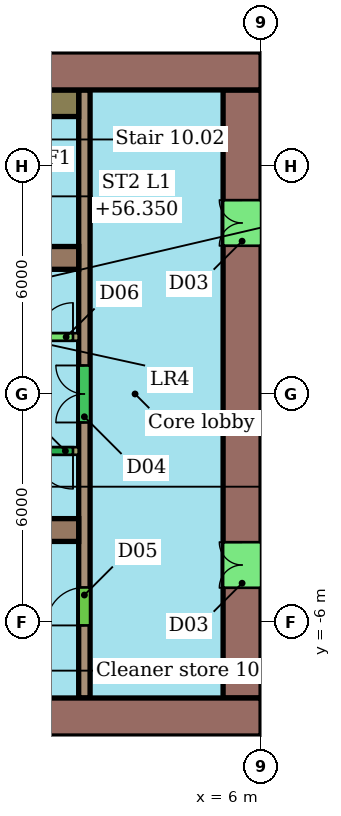
"""IFC4 building model, lengths in metres.
Left out: names, types, materials, properties, quantities, classifications, styles, units other than length and angle.
Written with IfcOpenShell. Run it as: python <this file> out.ifc"""

import sys

from ifc_helpers import new_model, si_unit, direction, frame, frame_2d, origin, place, context, subcontext, project, spatial, rectangle, extrude, element, fill, save


model = new_model("IFC4")
c1 = context("Model", 3, precision=1e-05, world=origin(), true_north=direction((0.0, 1.0)))
c2 = subcontext(c1, "Body", "Model", "MODEL_VIEW")
j1 = project(units=[si_unit("LENGTHUNIT", "METRE"), si_unit("PLANEANGLEUNIT", "RADIAN")], contexts=[c1])
p1 = place(None, origin())
s1 = spatial("IfcSite", under=j1, at=p1, CompositionType="ELEMENT")
p2 = place(p1, origin())
s2 = spatial("IfcBuilding", under=s1, at=p2, CompositionType="ELEMENT")
p3 = place(p2, frame((0.0, 0.0, 54.5)))
s3 = spatial("IfcBuildingStorey", under=s2, at=p3, CompositionType="ELEMENT", Elevation=54.5)
p4 = place(p3, frame((6.0, 8.5, 0.0), z_axis=(0.0, 0.0, 1.0), x_axis=(-1.0, 0.0, 0.0)))
e1 = element("IfcWall", 1, at=p4, inside=s3, PredefinedType="SHEAR", context=c2, shape_type="SweptSolid", body=[
    extrude(rectangle(XDim=12.0, YDim=1.0, at=frame_2d((6.0, 0.0))), origin(), (0.0, 0.0, 1.0), 3.4),
])
p5 = place(p4, frame((5.6, 0.0, 0.0)))
e2 = element("IfcOpeningElement", 2, at=p5, cuts=e1, PredefinedType="OPENING", context=c2, shape_type="SweptSolid", body=[
    extrude(rectangle(XDim=1.2, YDim=2.1, at=frame_2d((0.6, 1.05))), frame((0.0, 0.51, 0.0), z_axis=(0.0, -1.0, 0.0), x_axis=(1.0, 0.0, 0.0)), (0.0, 0.0, 1.0), 1.02),
])
p6 = place(p3, frame((-18.0, -8.5, 0.0), z_axis=(0.0, 0.0, 1.0), x_axis=(1.0, 0.0, 0.0)))
e3 = element("IfcWall", 3, at=p6, inside=s3, PredefinedType="SHEAR", context=c2, shape_type="SweptSolid", body=[
    extrude(rectangle(XDim=24.0, YDim=1.0, at=frame_2d((12.0, 0.0))), origin(), (0.0, 0.0, 1.0), 3.4),
])
p7 = place(p6, frame((6.0, 0.0, 0.0)))
e4 = element("IfcOpeningElement", 4, at=p7, cuts=e3, PredefinedType="OPENING", context=c2, shape_type="SweptSolid", body=[
    extrude(rectangle(XDim=1.2, YDim=2.1, at=frame_2d((0.6, 1.05))), frame((0.0, 0.51, 0.0), z_axis=(0.0, -1.0, 0.0), x_axis=(1.0, 0.0, 0.0)), (0.0, 0.0, 1.0), 1.02),
])
p8 = place(p3, frame((5.5, -8.0, 0.0), z_axis=(0.0, 0.0, 1.0), x_axis=(0.0, 1.0, 0.0)))
e5 = element("IfcWall", 5, at=p8, inside=s3, PredefinedType="SHEAR", context=c2, shape_type="SweptSolid", body=[
    extrude(rectangle(XDim=16.0, YDim=1.0, at=frame_2d((8.0, 0.0))), origin(), (0.0, 0.0, 1.0), 3.4),
])
p9 = place(p8, frame((2.9, 0.0, 0.0)))
e6 = element("IfcOpeningElement", 6, at=p9, cuts=e5, PredefinedType="OPENING", context=c2, shape_type="SweptSolid", body=[
    extrude(rectangle(XDim=1.2, YDim=2.1, at=frame_2d((0.6, 1.05))), frame((0.0, 0.51, 0.0), z_axis=(0.0, -1.0, 0.0), x_axis=(1.0, 0.0, 0.0)), (0.0, 0.0, 1.0), 1.02),
])
p10 = place(p8, frame((11.9, 0.0, 0.0)))
e7 = element("IfcOpeningElement", 7, at=p10, cuts=e5, PredefinedType="OPENING", context=c2, shape_type="SweptSolid", body=[
    extrude(rectangle(XDim=1.2, YDim=2.1, at=frame_2d((0.6, 1.05))), frame((0.0, 0.51, 0.0), z_axis=(0.0, -1.0, 0.0), x_axis=(1.0, 0.0, 0.0)), (0.0, 0.0, 1.0), 1.02),
])
for number, where, z_axis, x_axis in (
    (8, (-6.0, 3.58, 0.0), (0.0, 0.0, 1.0), (1.0, 0.0, 0.0)),
    (9, (-6.0, -3.58, 0.0), (0.0, 0.0, 1.0), (1.0, 0.0, 0.0)),
):
    element("IfcWall", number, at=place(p3, frame(where, z_axis=z_axis, x_axis=x_axis)), inside=s3, PredefinedType="SHEAR", context=c2, shape_type="SweptSolid", body=[
        extrude(rectangle(XDim=7.2, YDim=0.6, at=frame_2d((3.6, 0.0))), origin(), (0.0, 0.0, 1.0), 3.4),
    ])
p11 = place(p3, frame((1.35, -8.0, 0.0), z_axis=(0.0, 0.0, 1.0), x_axis=(0.0, 1.0, 0.0)))
e10 = element("IfcWall", 10, at=p11, inside=s3, PredefinedType="SHEAR", context=c2, shape_type="SweptSolid", body=[
    extrude(rectangle(XDim=16.0, YDim=0.3, at=frame_2d((8.0, 0.0))), origin(), (0.0, 0.0, 1.0), 3.4),
])
p12 = place(p11, frame((1.91, 0.0, 0.0)))
e11 = element("IfcOpeningElement", 11, at=p12, cuts=e10, PredefinedType="OPENING", context=c2, shape_type="SweptSolid", body=[
    extrude(rectangle(XDim=1.0, YDim=2.1, at=frame_2d((0.5, 1.05))), frame((0.0, 0.16, 0.0), z_axis=(0.0, -1.0, 0.0), x_axis=(1.0, 0.0, 0.0)), (0.0, 0.0, 1.0), 0.32),
])
p13 = place(p11, frame((7.25, 0.0, 0.0)))
e12 = element("IfcOpeningElement", 12, at=p13, cuts=e10, PredefinedType="OPENING", context=c2, shape_type="SweptSolid", body=[
    extrude(rectangle(XDim=1.5, YDim=2.1, at=frame_2d((0.75, 1.05))), frame((0.0, 0.16, 0.0), z_axis=(0.0, -1.0, 0.0), x_axis=(1.0, 0.0, 0.0)), (0.0, 0.0, 1.0), 0.32),
])
p14 = place(p3, frame((-13.2, 1.5, 0.0), z_axis=(0.0, 0.0, 1.0), x_axis=(1.0, 0.0, 0.0)))
e13 = element("IfcWall", 13, at=p14, inside=s3, PredefinedType="SHEAR", context=c2, shape_type="SweptSolid", body=[
    extrude(rectangle(XDim=14.4, YDim=0.2, at=frame_2d((7.2, 0.0))), origin(), (0.0, 0.0, 1.0), 3.4),
])
p15 = place(p14, frame((0.546, 0.0, 0.0)))
e14 = element("IfcOpeningElement", 14, at=p15, cuts=e13, PredefinedType="OPENING", context=c2, shape_type="SweptSolid", body=[
    extrude(rectangle(XDim=1.1, YDim=2.1, at=frame_2d((0.55, 1.05))), frame((0.0, 0.11, 0.0), z_axis=(0.0, -1.0, 0.0), x_axis=(1.0, 0.0, 0.0)), (0.0, 0.0, 1.0), 0.22),
])
p16 = place(p14, frame((2.988, 0.0, 0.0)))
e15 = element("IfcOpeningElement", 15, at=p16, cuts=e13, PredefinedType="OPENING", context=c2, shape_type="SweptSolid", body=[
    extrude(rectangle(XDim=1.1, YDim=2.1, at=frame_2d((0.55, 1.05))), frame((0.0, 0.11, 0.0), z_axis=(0.0, -1.0, 0.0), x_axis=(1.0, 0.0, 0.0)), (0.0, 0.0, 1.0), 0.22),
])
p17 = place(p14, frame((5.429, 0.0, 0.0)))
e16 = element("IfcOpeningElement", 16, at=p17, cuts=e13, PredefinedType="OPENING", context=c2, shape_type="SweptSolid", body=[
    extrude(rectangle(XDim=1.1, YDim=2.1, at=frame_2d((0.55, 1.05))), frame((0.0, 0.11, 0.0), z_axis=(0.0, -1.0, 0.0), x_axis=(1.0, 0.0, 0.0)), (0.0, 0.0, 1.0), 0.22),
])
p18 = place(p14, frame((7.871, 0.0, 0.0)))
e17 = element("IfcOpeningElement", 17, at=p18, cuts=e13, PredefinedType="OPENING", context=c2, shape_type="SweptSolid", body=[
    extrude(rectangle(XDim=1.1, YDim=2.1, at=frame_2d((0.55, 1.05))), frame((0.0, 0.11, 0.0), z_axis=(0.0, -1.0, 0.0), x_axis=(1.0, 0.0, 0.0)), (0.0, 0.0, 1.0), 0.22),
])
p19 = place(p14, frame((10.958, 0.0, 0.0)))
e18 = element("IfcOpeningElement", 18, at=p19, cuts=e13, PredefinedType="OPENING", context=c2, shape_type="SweptSolid", body=[
    extrude(rectangle(XDim=0.9, YDim=2.1, at=frame_2d((0.45, 1.05))), frame((0.0, 0.11, 0.0), z_axis=(0.0, -1.0, 0.0), x_axis=(1.0, 0.0, 0.0)), (0.0, 0.0, 1.0), 0.22),
])
p20 = place(p14, frame((13.35, 0.0, 0.0)))
e19 = element("IfcOpeningElement", 19, at=p20, cuts=e13, PredefinedType="OPENING", context=c2, shape_type="SweptSolid", body=[
    extrude(rectangle(XDim=0.9, YDim=2.1, at=frame_2d((0.45, 1.05))), frame((0.0, 0.11, 0.0), z_axis=(0.0, -1.0, 0.0), x_axis=(1.0, 0.0, 0.0)), (0.0, 0.0, 1.0), 0.22),
])
p21 = place(p3, frame((1.2, -1.5, 0.0), z_axis=(0.0, 0.0, 1.0), x_axis=(-1.0, 0.0, 0.0)))
e20 = element("IfcWall", 20, at=p21, inside=s3, PredefinedType="SHEAR", context=c2, shape_type="SweptSolid", body=[
    extrude(rectangle(XDim=14.4, YDim=0.2, at=frame_2d((7.2, 0.0))), origin(), (0.0, 0.0, 1.0), 3.4),
])
p22 = place(p21, frame((7.821, 0.0, 0.0)))
e21 = element("IfcOpeningElement", 21, at=p22, cuts=e20, PredefinedType="OPENING", context=c2, shape_type="SweptSolid", body=[
    extrude(rectangle(XDim=1.2, YDim=2.1, at=frame_2d((0.6, 1.05))), frame((0.0, 0.11, 0.0), z_axis=(0.0, -1.0, 0.0), x_axis=(1.0, 0.0, 0.0)), (0.0, 0.0, 1.0), 0.22),
])
p23 = place(p21, frame((0.15, 0.0, 0.0)))
e22 = element("IfcOpeningElement", 22, at=p23, cuts=e20, PredefinedType="OPENING", context=c2, shape_type="SweptSolid", body=[
    extrude(rectangle(XDim=1.0, YDim=2.1, at=frame_2d((0.5, 1.05))), frame((0.0, 0.11, 0.0), z_axis=(0.0, -1.0, 0.0), x_axis=(1.0, 0.0, 0.0)), (0.0, 0.0, 1.0), 0.22),
])
p24 = place(p3, frame((0.4, 7.65, 0.0), z_axis=(0.0, 0.0, 1.0), x_axis=(1.0, 0.0, 0.0)))
e23 = element("IfcWall", 23, at=p24, inside=s3, PredefinedType="SHEAR", context=c2, shape_type="SweptSolid", body=[
    extrude(rectangle(XDim=0.8, YDim=0.7, at=frame_2d((0.4, 0.0))), origin(), (0.0, 0.0, 1.0), 3.4),
])
p25 = place(p9, origin())
e24 = element("IfcDoor", 24, at=p25, inside=s3, OperationType="DOUBLE_DOOR_SINGLE_SWING", PredefinedType="NOTDEFINED", context=c2, shape_type="SweptSolid", body=[
    extrude(rectangle(XDim=1.2, YDim=2.1, at=frame_2d((0.6, 1.05))), frame((0.0, 0.025, 0.0), z_axis=(0.0, -1.0, 0.0), x_axis=(1.0, 0.0, 0.0)), (0.0, 0.0, 1.0), 0.05),
])
fill(e6, e24)
p26 = place(p10, origin())
e25 = element("IfcDoor", 25, at=p26, inside=s3, OperationType="DOUBLE_DOOR_SINGLE_SWING", PredefinedType="NOTDEFINED", context=c2, shape_type="SweptSolid", body=[
    extrude(rectangle(XDim=1.2, YDim=2.1, at=frame_2d((0.6, 1.05))), frame((0.0, 0.025, 0.0), z_axis=(0.0, -1.0, 0.0), x_axis=(1.0, 0.0, 0.0)), (0.0, 0.0, 1.0), 0.05),
])
fill(e7, e25)
p27 = place(p12, origin())
e26 = element("IfcDoor", 26, at=p27, inside=s3, OperationType="SINGLE_SWING_LEFT", PredefinedType="NOTDEFINED", context=c2, shape_type="SweptSolid", body=[
    extrude(rectangle(XDim=1.0, YDim=2.1, at=frame_2d((0.5, 1.05))), frame((0.0, 0.025, 0.0), z_axis=(0.0, -1.0, 0.0), x_axis=(1.0, 0.0, 0.0)), (0.0, 0.0, 1.0), 0.05),
])
fill(e11, e26)
p28 = place(p13, origin())
e27 = element("IfcDoor", 27, at=p28, inside=s3, OperationType="DOUBLE_DOOR_SINGLE_SWING", PredefinedType="NOTDEFINED", context=c2, shape_type="SweptSolid", body=[
    extrude(rectangle(XDim=1.5, YDim=2.1, at=frame_2d((0.75, 1.05))), frame((0.0, 0.025, 0.0), z_axis=(0.0, -1.0, 0.0), x_axis=(1.0, 0.0, 0.0)), (0.0, 0.0, 1.0), 0.05),
])
fill(e12, e27)
p29 = place(p20, origin())
e28 = element("IfcDoor", 28, at=p29, inside=s3, OperationType="SINGLE_SWING_RIGHT", PredefinedType="NOTDEFINED", context=c2, shape_type="SweptSolid", body=[
    extrude(rectangle(XDim=0.9, YDim=2.1, at=frame_2d((0.45, 1.05))), frame((0.0, 0.025, 0.0), z_axis=(0.0, -1.0, 0.0), x_axis=(1.0, 0.0, 0.0)), (0.0, 0.0, 1.0), 0.05),
])
fill(e19, e28)
p30 = place(p23, origin())
e29 = element("IfcDoor", 29, at=p30, inside=s3, OperationType="SINGLE_SWING_LEFT", PredefinedType="NOTDEFINED", context=c2, shape_type="SweptSolid", body=[
    extrude(rectangle(XDim=1.0, YDim=2.1, at=frame_2d((0.5, 1.05))), frame((0.0, 0.025, 0.0), z_axis=(0.0, -1.0, 0.0), x_axis=(1.0, 0.0, 0.0)), (0.0, 0.0, 1.0), 0.05),
])
fill(e22, e29)
save(model, sys.argv[1])
